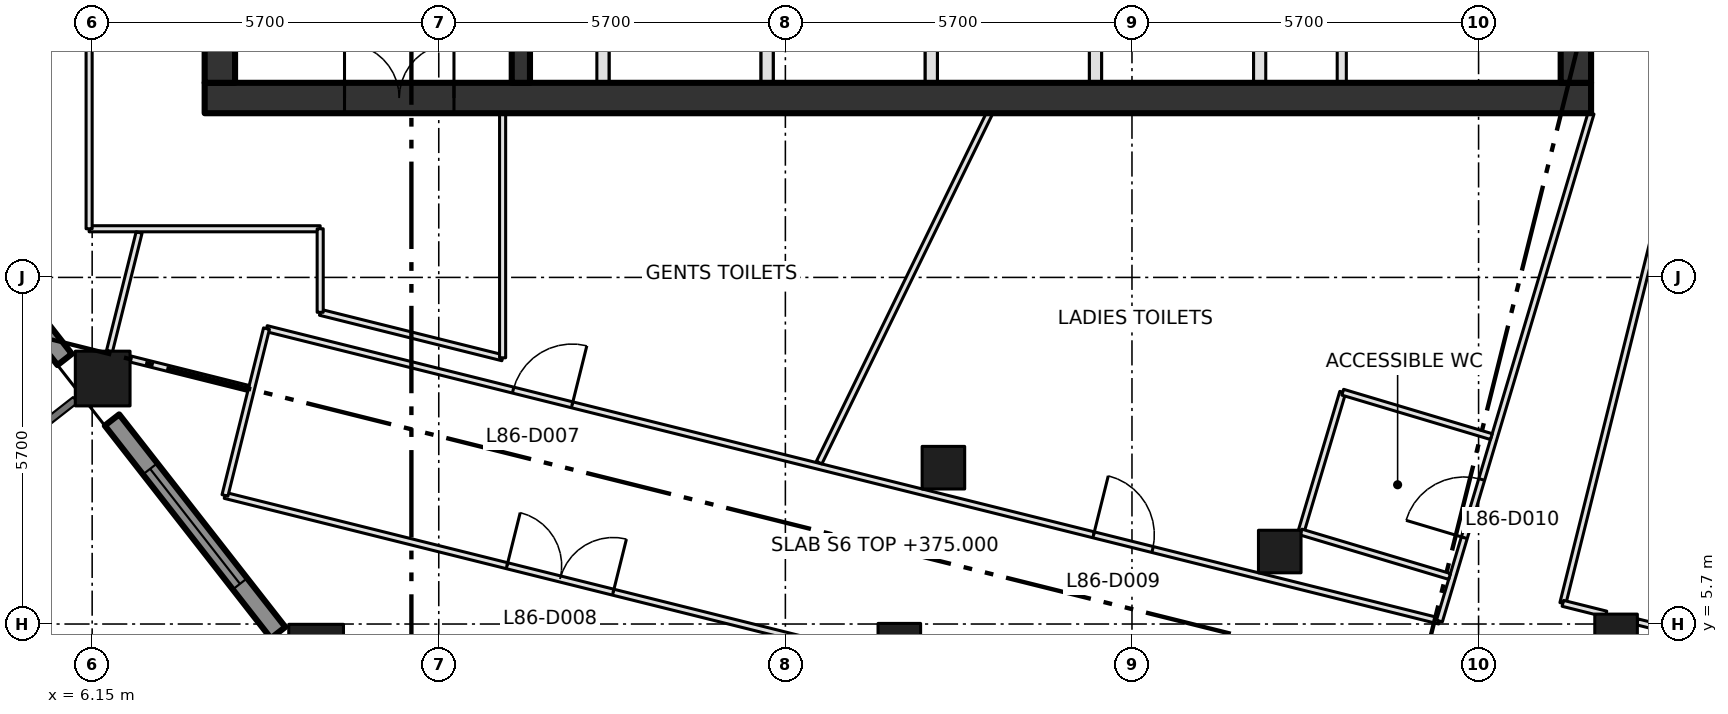
"""IFC4 building model, lengths in metres.
Left out: names, types, materials, properties, quantities, classifications, styles, units other than length and angle.
Written with IfcOpenShell. Run it as: python <this file> out.ifc"""

import sys

from ifc_helpers import new_model, si_unit, direction, frame, frame_2d, origin, origin_2d, place, context, subcontext, project, spatial, rectangle, extrude, element, fill, save


model = new_model("IFC4")
c1 = context("Model", 3, precision=1e-05, world=origin(), true_north=direction((0.0, 1.0)))
c2 = subcontext(c1, "Body", "Model", "MODEL_VIEW")
j1 = project(units=[si_unit("LENGTHUNIT", "METRE"), si_unit("PLANEANGLEUNIT", "RADIAN")], contexts=[c1])
p1 = place(None, origin())
s1 = spatial("IfcSite", under=j1, at=p1, CompositionType="ELEMENT")
p2 = place(p1, origin())
s2 = spatial("IfcBuilding", under=s1, at=p2, CompositionType="ELEMENT")
p3 = place(p2, frame((0.0, 0.0, 375.0)))
s3 = spatial("IfcBuildingStorey", under=s2, at=p3, CompositionType="ELEMENT", Elevation=375.0)
for number, where, z_axis, x_axis in (
    (1, (9.833, 5.245, 0.0), (0.0, 0.0, 1.0), (1.0, 0.0, 0.0)),
    (2, (6.323, 9.737, 0.0), (0.0, 0.0, 1.0), (1.0, 0.0, 0.0)),
):
    element("IfcColumn", number, at=place(p3, frame(where, z_axis=z_axis, x_axis=x_axis)), inside=s3, PredefinedType="COLUMN", context=c2, shape_type="SweptSolid", body=[
        extrude(rectangle(XDim=0.9, YDim=0.9, at=origin_2d()), origin(), (0.0, 0.0, 1.0), 4.2),
    ])
for number, where, z_axis, x_axis in (
    (3, (19.424, 5.36, 0.0), (0.0, 0.0, 1.0), (1.0, 0.0, 0.0)),
    (4, (20.149, 8.271, 0.0), (0.0, 0.0, 1.0), (1.0, 0.0, 0.0)),
    (5, (25.68, 6.892, 0.0), (0.0, 0.0, 1.0), (1.0, 0.0, 0.0)),
    (6, (31.211, 5.513, 0.0), (0.0, 0.0, 1.0), (1.0, 0.0, 0.0)),
):
    element("IfcColumn", number, at=place(p3, frame(where, z_axis=z_axis, x_axis=x_axis)), inside=s3, PredefinedType="COLUMN", context=c2, shape_type="SweptSolid", body=[
        extrude(rectangle(XDim=0.7, YDim=0.7, at=origin_2d()), origin(), (0.0, 0.0, 1.0), 4.2),
    ])
p4 = place(p3, frame((8.0, 14.35, -0.3), z_axis=(0.0, 0.0, 1.0), x_axis=(1.0, 0.0, 0.0)))
e7 = element("IfcWall", 7, at=p4, inside=s3, PredefinedType="SHEAR", context=c2, shape_type="SweptSolid", body=[
    extrude(rectangle(XDim=22.8, YDim=0.5, at=frame_2d((11.4, 0.0))), origin(), (0.0, 0.0, 1.0), 4.2),
])
p5 = place(p4, frame((2.3, 0.0, 0.3)))
e8 = element("IfcOpeningElement", 8, at=p5, cuts=e7, PredefinedType="OPENING", context=c2, shape_type="SweptSolid", body=[
    extrude(rectangle(XDim=1.8, YDim=2.1, at=frame_2d((0.9, 1.05))), frame((0.0, 0.26, 0.0), z_axis=(0.0, -1.0, 0.0), x_axis=(1.0, 0.0, 0.0)), (0.0, 0.0, 1.0), 0.52),
])
for number, where, z_axis, x_axis in (
    (9, (8.25, 14.6, -0.3), (0.0, 0.0, 1.0), (0.0, 1.0, 0.0)),
    (10, (30.55, 14.6, -0.3), (0.0, 0.0, 1.0), (0.0, 1.0, 0.0)),
):
    element("IfcWall", number, at=place(p3, frame(where, z_axis=z_axis, x_axis=x_axis)), inside=s3, PredefinedType="SHEAR", context=c2, shape_type="SweptSolid", body=[
        extrude(rectangle(XDim=21.1, YDim=0.5, at=frame_2d((10.55, 0.0))), origin(), (0.0, 0.0, 1.0), 4.2),
    ])
p6 = place(p3, frame((13.2, 14.6, 0.0), z_axis=(0.0, 0.0, 1.0), x_axis=(0.0, 1.0, 0.0)))
e11 = element("IfcWall", 11, at=p6, inside=s3, PredefinedType="SHEAR", context=c2, shape_type="SweptSolid", body=[
    extrude(rectangle(XDim=21.1, YDim=0.3, at=frame_2d((10.55, 0.0))), origin(), (0.0, 0.0, 1.0), 3.9),
])
p7 = place(p6, frame((3.7, 0.0, 0.0)))
e12 = element("IfcOpeningElement", 12, at=p7, cuts=e11, PredefinedType="OPENING", context=c2, shape_type="SweptSolid", body=[
    extrude(rectangle(XDim=1.8, YDim=2.1, at=frame_2d((0.9, 1.05))), frame((0.0, 0.16, 0.0), z_axis=(0.0, -1.0, 0.0), x_axis=(1.0, 0.0, 0.0)), (0.0, 0.0, 1.0), 0.32),
])
p8 = place(p6, frame((11.8, 0.0, 0.0)))
e13 = element("IfcOpeningElement", 13, at=p8, cuts=e11, PredefinedType="OPENING", context=c2, shape_type="SweptSolid", body=[
    extrude(rectangle(XDim=1.2, YDim=2.1, at=frame_2d((0.6, 1.05))), frame((0.0, 0.16, 0.0), z_axis=(0.0, -1.0, 0.0), x_axis=(1.0, 0.0, 0.0)), (0.0, 0.0, 1.0), 0.32),
])
for number, where, z_axis, x_axis in (
    (14, (14.55, 14.6, 0.0), (0.0, 0.0, 1.0), (0.0, 1.0, 0.0)),
    (15, (17.25, 14.6, 0.0), (0.0, 0.0, 1.0), (0.0, 1.0, 0.0)),
    (16, (19.95, 14.6, 0.0), (0.0, 0.0, 1.0), (0.0, 1.0, 0.0)),
    (17, (22.65, 14.6, 0.0), (0.0, 0.0, 1.0), (0.0, 1.0, 0.0)),
    (18, (25.35, 14.6, 0.0), (0.0, 0.0, 1.0), (0.0, 1.0, 0.0)),
):
    element("IfcWall", number, at=place(p3, frame(where, z_axis=z_axis, x_axis=x_axis)), inside=s3, PredefinedType="SOLIDWALL", context=c2, shape_type="SweptSolid", body=[
        extrude(rectangle(XDim=3.0, YDim=0.2, at=frame_2d((1.5, 0.0))), origin(), (0.0, 0.0, 1.0), 3.9),
    ])
p9 = place(p3, frame((26.7, 14.6, 0.0), z_axis=(0.0, 0.0, 1.0), x_axis=(0.0, 1.0, 0.0)))
e19 = element("IfcWall", 19, at=p9, inside=s3, PredefinedType="PARTITIONING", context=c2, shape_type="SweptSolid", body=[
    extrude(rectangle(XDim=3.0, YDim=0.15, at=frame_2d((1.5, 0.0))), origin(), (0.0, 0.0, 1.0), 3.9),
])
p10 = place(p3, frame((2.967, 13.547, 0.0), z_axis=(0.0, 0.0, 1.0), x_axis=(0.615486001463, -0.788147817356, 0.0)))
e20 = element("IfcWall", 20, at=p10, inside=s3, PredefinedType="SOLIDWALL", context=c2, shape_type="SweptSolid", body=[
    extrude(rectangle(XDim=4.437, YDim=0.3, at=frame_2d((2.219, 0.0))), origin(), (0.0, 0.0, 1.0), 3.2),
])
p11 = place(p10, frame((1.018, 0.0, 0.8)))
e21 = element("IfcOpeningElement", 21, at=p11, cuts=e20, PredefinedType="OPENING", context=c2, shape_type="SweptSolid", body=[
    extrude(rectangle(XDim=2.4, YDim=2.1, at=frame_2d((1.2, 1.05))), frame((0.0, 0.16, 0.0), z_axis=(0.0, -1.0, 0.0), x_axis=(1.0, 0.0, 0.0)), (0.0, 0.0, 1.0), 0.32),
])
p12 = place(p3, frame((6.476, 9.055, 0.0), z_axis=(0.0, 0.0, 1.0), x_axis=(0.615649380255, -0.788020203162, 0.0)))
e22 = element("IfcWall", 22, at=p12, inside=s3, PredefinedType="SOLIDWALL", context=c2, shape_type="SweptSolid", body=[
    extrude(rectangle(XDim=4.438, YDim=0.3, at=frame_2d((2.219, 0.0))), origin(), (0.0, 0.0, 1.0), 3.2),
])
p13 = place(p12, frame((1.019, 0.0, 0.8)))
e23 = element("IfcOpeningElement", 23, at=p13, cuts=e22, PredefinedType="OPENING", context=c2, shape_type="SweptSolid", body=[
    extrude(rectangle(XDim=2.4, YDim=2.1, at=frame_2d((1.2, 1.05))), frame((0.0, 0.16, 0.0), z_axis=(0.0, -1.0, 0.0), x_axis=(1.0, 0.0, 0.0)), (0.0, 0.0, 1.0), 0.32),
])
p14 = place(p3, frame((6.1, 12.2, 0.0), z_axis=(0.0, 0.0, 1.0), x_axis=(1.0, 0.0, 0.0)))
e24 = element("IfcWall", 24, at=p14, inside=s3, PredefinedType="PARTITIONING", context=c2, shape_type="SweptSolid", body=[
    extrude(rectangle(XDim=3.8, YDim=0.1, at=frame_2d((1.9, 0.0))), origin(), (0.0, 0.0, 1.0), 3.9),
])
p15 = place(p3, frame((6.1, 38.9, 0.0), z_axis=(0.0, 0.0, 1.0), x_axis=(0.0, -1.0, 0.0)))
e25 = element("IfcWall", 25, at=p15, inside=s3, PredefinedType="PARTITIONING", context=c2, shape_type="SweptSolid", body=[
    extrude(rectangle(XDim=26.7, YDim=0.1, at=frame_2d((13.35, 0.0))), origin(), (0.0, 0.0, 1.0), 3.9),
])
p16 = place(p15, frame((21.068, 0.0, 0.0)))
e26 = element("IfcOpeningElement", 26, at=p16, cuts=e25, PredefinedType="OPENING", context=c2, shape_type="SweptSolid", body=[
    extrude(rectangle(XDim=1.0, YDim=2.1, at=frame_2d((0.5, 1.05))), frame((0.0, 0.06, 0.0), z_axis=(0.0, -1.0, 0.0), x_axis=(1.0, 0.0, 0.0)), (0.0, 0.0, 1.0), 0.12),
])
p17 = place(p15, frame((10.568, 0.0, 0.0)))
e27 = element("IfcOpeningElement", 27, at=p17, cuts=e25, PredefinedType="OPENING", context=c2, shape_type="SweptSolid", body=[
    extrude(rectangle(XDim=1.0, YDim=2.1, at=frame_2d((0.5, 1.05))), frame((0.0, 0.06, 0.0), z_axis=(0.0, -1.0, 0.0), x_axis=(1.0, 0.0, 0.0)), (0.0, 0.0, 1.0), 0.12),
])
p18 = place(p3, frame((8.334, 7.815, 0.0), z_axis=(0.0, 0.0, 1.0), x_axis=(0.970312231044, -0.241855688968, 0.0)))
e28 = element("IfcWall", 28, at=p18, inside=s3, PredefinedType="PARTITIONING", context=c2, shape_type="SweptSolid", body=[
    extrude(rectangle(XDim=11.069, YDim=0.1, at=frame_2d((5.534, 0.0))), origin(), (0.0, 0.0, 1.0), 3.9),
])
p19 = place(p18, frame((4.78, 0.0, 0.0)))
e29 = element("IfcOpeningElement", 29, at=p19, cuts=e28, PredefinedType="OPENING", context=c2, shape_type="SweptSolid", body=[
    extrude(rectangle(XDim=1.8, YDim=2.1, at=frame_2d((0.9, 1.05))), frame((0.0, 0.06, 0.0), z_axis=(0.0, -1.0, 0.0), x_axis=(1.0, 0.0, 0.0)), (0.0, 0.0, 1.0), 0.12),
])
p20 = place(p3, frame((9.017, 10.558, 0.0), z_axis=(0.0, 0.0, 1.0), x_axis=(0.970297621765, -0.241914293082, 0.0)))
e30 = element("IfcWall", 30, at=p20, inside=s3, PredefinedType="PARTITIONING", context=c2, shape_type="SweptSolid", body=[
    extrude(rectangle(XDim=19.879, YDim=0.1, at=frame_2d((9.94, 0.0))), origin(), (0.0, 0.0, 1.0), 3.9),
])
p21 = place(p20, frame((4.18, 0.0, 0.0)))
e31 = element("IfcOpeningElement", 31, at=p21, cuts=e30, PredefinedType="OPENING", context=c2, shape_type="SweptSolid", body=[
    extrude(rectangle(XDim=1.0, YDim=2.1, at=frame_2d((0.5, 1.05))), frame((0.0, 0.06, 0.0), z_axis=(0.0, -1.0, 0.0), x_axis=(1.0, 0.0, 0.0)), (0.0, 0.0, 1.0), 0.12),
])
p22 = place(p20, frame((14.018, 0.0, 0.0)))
e32 = element("IfcOpeningElement", 32, at=p22, cuts=e30, PredefinedType="OPENING", context=c2, shape_type="SweptSolid", body=[
    extrude(rectangle(XDim=1.0, YDim=2.1, at=frame_2d((0.5, 1.05))), frame((0.0, 0.06, 0.0), z_axis=(0.0, -1.0, 0.0), x_axis=(1.0, 0.0, 0.0)), (0.0, 0.0, 1.0), 0.12),
])
p23 = place(p3, frame((9.017, 10.558, 0.0), z_axis=(0.0, 0.0, 1.0), x_axis=(-0.241641419317, -0.970365613813, 0.0)))
e33 = element("IfcWall", 33, at=p23, inside=s3, PredefinedType="PARTITIONING", context=c2, shape_type="SweptSolid", body=[
    extrude(rectangle(XDim=2.827, YDim=0.1, at=frame_2d((1.414, 0.0))), origin(), (0.0, 0.0, 1.0), 3.9),
])
p24 = place(p3, frame((9.9, 10.826, 0.0), z_axis=(0.0, 0.0, 1.0), x_axis=(0.970290953223, -0.241941038466, 0.0)))
e34 = element("IfcWall", 34, at=p24, inside=s3, PredefinedType="PARTITIONING", context=c2, shape_type="SweptSolid", body=[
    extrude(rectangle(XDim=3.092, YDim=0.1, at=frame_2d((1.546, 0.0))), origin(), (0.0, 0.0, 1.0), 3.9),
])
p25 = place(p3, frame((9.9, 12.2, 0.0), z_axis=(0.0, 0.0, 1.0), x_axis=(0.0, -1.0, 0.0)))
e35 = element("IfcWall", 35, at=p25, inside=s3, PredefinedType="PARTITIONING", context=c2, shape_type="SweptSolid", body=[
    extrude(rectangle(XDim=1.374, YDim=0.1, at=frame_2d((0.687, 0.0))), origin(), (0.0, 0.0, 1.0), 3.9),
])
p26 = place(p3, frame((12.9, 10.078, 0.0), z_axis=(0.0, 0.0, 1.0), x_axis=(0.0, 1.0, 0.0)))
e36 = element("IfcWall", 36, at=p26, inside=s3, PredefinedType="PARTITIONING", context=c2, shape_type="SweptSolid", body=[
    extrude(rectangle(XDim=4.022, YDim=0.1, at=frame_2d((2.011, 0.0))), origin(), (0.0, 0.0, 1.0), 3.9),
])
p27 = place(p3, frame((28.306, 5.749, 0.0), z_axis=(0.0, 0.0, 1.0), x_axis=(0.286170650389, 0.958178667502, 0.0)))
e37 = element("IfcWall", 37, at=p27, inside=s3, PredefinedType="PARTITIONING", context=c2, shape_type="SweptSolid", body=[
    extrude(rectangle(XDim=8.716, YDim=0.1, at=frame_2d((4.358, 0.0))), origin(), (0.0, 0.0, 1.0), 3.9),
])
p28 = place(p27, frame((1.43, 0.0, 0.0)))
e38 = element("IfcOpeningElement", 38, at=p28, cuts=e37, PredefinedType="OPENING", context=c2, shape_type="SweptSolid", body=[
    extrude(rectangle(XDim=1.0, YDim=2.1, at=frame_2d((0.5, 1.05))), frame((0.0, 0.06, 0.0), z_axis=(0.0, -1.0, 0.0), x_axis=(1.0, 0.0, 0.0)), (0.0, 0.0, 1.0), 0.12),
])
p29 = place(p3, frame((30.336, 6.04, 0.0), z_axis=(0.0, 0.0, 1.0), x_axis=(0.2420145387, 0.970272623059, 0.0)))
e39 = element("IfcWall", 39, at=p29, inside=s3, PredefinedType="PARTITIONING", context=c2, shape_type="SweptSolid", body=[
    extrude(rectangle(XDim=7.276, YDim=0.1, at=frame_2d((3.638, 0.0))), origin(), (0.0, 0.0, 1.0), 3.9),
])
p30 = place(p3, frame((31.046, 5.863, 0.0), z_axis=(0.0, 0.0, 1.0), x_axis=(-0.970299315901, 0.241907497946, 0.0)))
e40 = element("IfcWall", 40, at=p30, inside=s3, PredefinedType="PARTITIONING", context=c2, shape_type="SweptSolid", body=[
    extrude(rectangle(XDim=0.732, YDim=0.1, at=frame_2d((0.366, 0.0))), origin(), (0.0, 0.0, 1.0), 3.9),
])
p31 = place(p3, frame((31.561, 5.735, 0.0), z_axis=(0.0, 0.0, 1.0), x_axis=(0.970267382462, -0.242035548071, 0.0)))
e41 = element("IfcWall", 41, at=p31, inside=s3, PredefinedType="PARTITIONING", context=c2, shape_type="SweptSolid", body=[
    extrude(rectangle(XDim=5.17, YDim=0.1, at=frame_2d((2.585, 0.0))), origin(), (0.0, 0.0, 1.0), 3.9),
])
p32 = place(p31, frame((1.28, 0.0, 0.0)))
e42 = element("IfcOpeningElement", 42, at=p32, cuts=e41, PredefinedType="OPENING", context=c2, shape_type="SweptSolid", body=[
    extrude(rectangle(XDim=1.0, YDim=2.1, at=frame_2d((0.5, 1.05))), frame((0.0, 0.06, 0.0), z_axis=(0.0, -1.0, 0.0), x_axis=(1.0, 0.0, 0.0)), (0.0, 0.0, 1.0), 0.12),
])
p33 = place(p3, frame((6.922, 12.138, 0.0), z_axis=(0.0, 0.0, 1.0), x_axis=(-0.24222136375, -0.97022101139, 0.0)))
e43 = element("IfcWall", 43, at=p33, inside=s3, PredefinedType="PARTITIONING", context=c2, shape_type="SweptSolid", body=[
    extrude(rectangle(XDim=2.011, YDim=0.1, at=frame_2d((1.005, 0.0))), origin(), (0.0, 0.0, 1.0), 3.9),
])
p34 = place(p3, frame((8.72, 9.574, 0.0), z_axis=(0.0, 0.0, 1.0), x_axis=(-0.970221168815, 0.24222073318, 0.0)))
e44 = element("IfcWall", 44, at=p34, inside=s3, PredefinedType="PARTITIONING", context=c2, shape_type="SweptSolid", body=[
    extrude(rectangle(XDim=2.007, YDim=0.1, at=frame_2d((1.003, 0.0))), origin(), (0.0, 0.0, 1.0), 3.9),
])
p35 = place(p3, frame((18.105, 8.354, 0.0), z_axis=(0.0, 0.0, 1.0), x_axis=(0.438424384383, 0.898768078638, 0.0)))
e45 = element("IfcWall", 45, at=p35, inside=s3, PredefinedType="PARTITIONING", context=c2, shape_type="SweptSolid", body=[
    extrude(rectangle(XDim=6.393, YDim=0.1, at=frame_2d((3.197, 0.0))), origin(), (0.0, 0.0, 1.0), 3.9),
])
p36 = place(p3, frame((26.03, 7.214, 0.0), z_axis=(0.0, 0.0, 1.0), x_axis=(0.286077381682, 0.958206518288, 0.0)))
e46 = element("IfcWall", 46, at=p36, inside=s3, PredefinedType="PARTITIONING", context=c2, shape_type="SweptSolid", body=[
    extrude(rectangle(XDim=2.398, YDim=0.1, at=frame_2d((1.199, 0.0))), origin(), (0.0, 0.0, 1.0), 3.9),
])
p37 = place(p3, frame((26.716, 9.512, 0.0), z_axis=(0.0, 0.0, 1.0), x_axis=(0.958168093169, -0.286206053804, 0.0)))
e47 = element("IfcWall", 47, at=p37, inside=s3, PredefinedType="PARTITIONING", context=c2, shape_type="SweptSolid", body=[
    extrude(rectangle(XDim=2.551, YDim=0.1, at=frame_2d((1.275, 0.0))), origin(), (0.0, 0.0, 1.0), 3.9),
])
p38 = place(p3, frame((28.473, 6.482, 0.0), z_axis=(0.0, 0.0, 1.0), x_axis=(-0.958136712348, 0.286311090338, 0.0)))
e48 = element("IfcWall", 48, at=p38, inside=s3, PredefinedType="PARTITIONING", context=c2, shape_type="SweptSolid", body=[
    extrude(rectangle(XDim=2.55, YDim=0.1, at=frame_2d((1.275, 0.0))), origin(), (0.0, 0.0, 1.0), 3.9),
])
p39 = place(p5, origin())
e49 = element("IfcDoor", 49, at=p39, inside=s3, OperationType="DOUBLE_DOOR_SINGLE_SWING", PredefinedType="DOOR", context=c2, shape_type="SweptSolid", body=[
    extrude(rectangle(XDim=1.8, YDim=2.1, at=frame_2d((0.9, 1.05))), frame((0.0, 0.025, 0.0), z_axis=(0.0, -1.0, 0.0), x_axis=(1.0, 0.0, 0.0)), (0.0, 0.0, 1.0), 0.05),
])
fill(e8, e49)
p40 = place(p13, origin())
e50 = element("IfcWindow", 50, at=p40, inside=s3, PartitioningType="DOUBLE_PANEL_VERTICAL", PredefinedType="WINDOW", context=c2, shape_type="SweptSolid", body=[
    extrude(rectangle(XDim=2.4, YDim=2.1, at=frame_2d((1.2, 1.05))), frame((0.0, 0.03, 0.0), z_axis=(0.0, -1.0, 0.0), x_axis=(1.0, 0.0, 0.0)), (0.0, 0.0, 1.0), 0.06),
])
fill(e23, e50)
p41 = place(p21, origin())
e51 = element("IfcDoor", 51, at=p41, inside=s3, OperationType="SINGLE_SWING_RIGHT", PredefinedType="DOOR", context=c2, shape_type="SweptSolid", body=[
    extrude(rectangle(XDim=1.0, YDim=2.1, at=frame_2d((0.5, 1.05))), frame((0.0, 0.025, 0.0), z_axis=(0.0, -1.0, 0.0), x_axis=(1.0, 0.0, 0.0)), (0.0, 0.0, 1.0), 0.05),
])
fill(e31, e51)
p42 = place(p19, origin())
e52 = element("IfcDoor", 52, at=p42, inside=s3, OperationType="DOUBLE_DOOR_SINGLE_SWING", PredefinedType="DOOR", context=c2, shape_type="SweptSolid", body=[
    extrude(rectangle(XDim=1.8, YDim=2.1, at=frame_2d((0.9, 1.05))), frame((0.0, 0.025, 0.0), z_axis=(0.0, -1.0, 0.0), x_axis=(1.0, 0.0, 0.0)), (0.0, 0.0, 1.0), 0.05),
])
fill(e29, e52)
p43 = place(p22, origin())
e53 = element("IfcDoor", 53, at=p43, inside=s3, OperationType="SINGLE_SWING_LEFT", PredefinedType="DOOR", context=c2, shape_type="SweptSolid", body=[
    extrude(rectangle(XDim=1.0, YDim=2.1, at=frame_2d((0.5, 1.05))), frame((0.0, 0.025, 0.0), z_axis=(0.0, -1.0, 0.0), x_axis=(1.0, 0.0, 0.0)), (0.0, 0.0, 1.0), 0.05),
])
fill(e32, e53)
p44 = place(p28, origin())
e54 = element("IfcDoor", 54, at=p44, inside=s3, OperationType="SINGLE_SWING_LEFT", PredefinedType="DOOR", context=c2, shape_type="SweptSolid", body=[
    extrude(rectangle(XDim=1.0, YDim=2.1, at=frame_2d((0.5, 1.05))), frame((0.0, 0.025, 0.0), z_axis=(0.0, -1.0, 0.0), x_axis=(1.0, 0.0, 0.0)), (0.0, 0.0, 1.0), 0.05),
])
fill(e38, e54)
save(model, sys.argv[1])
